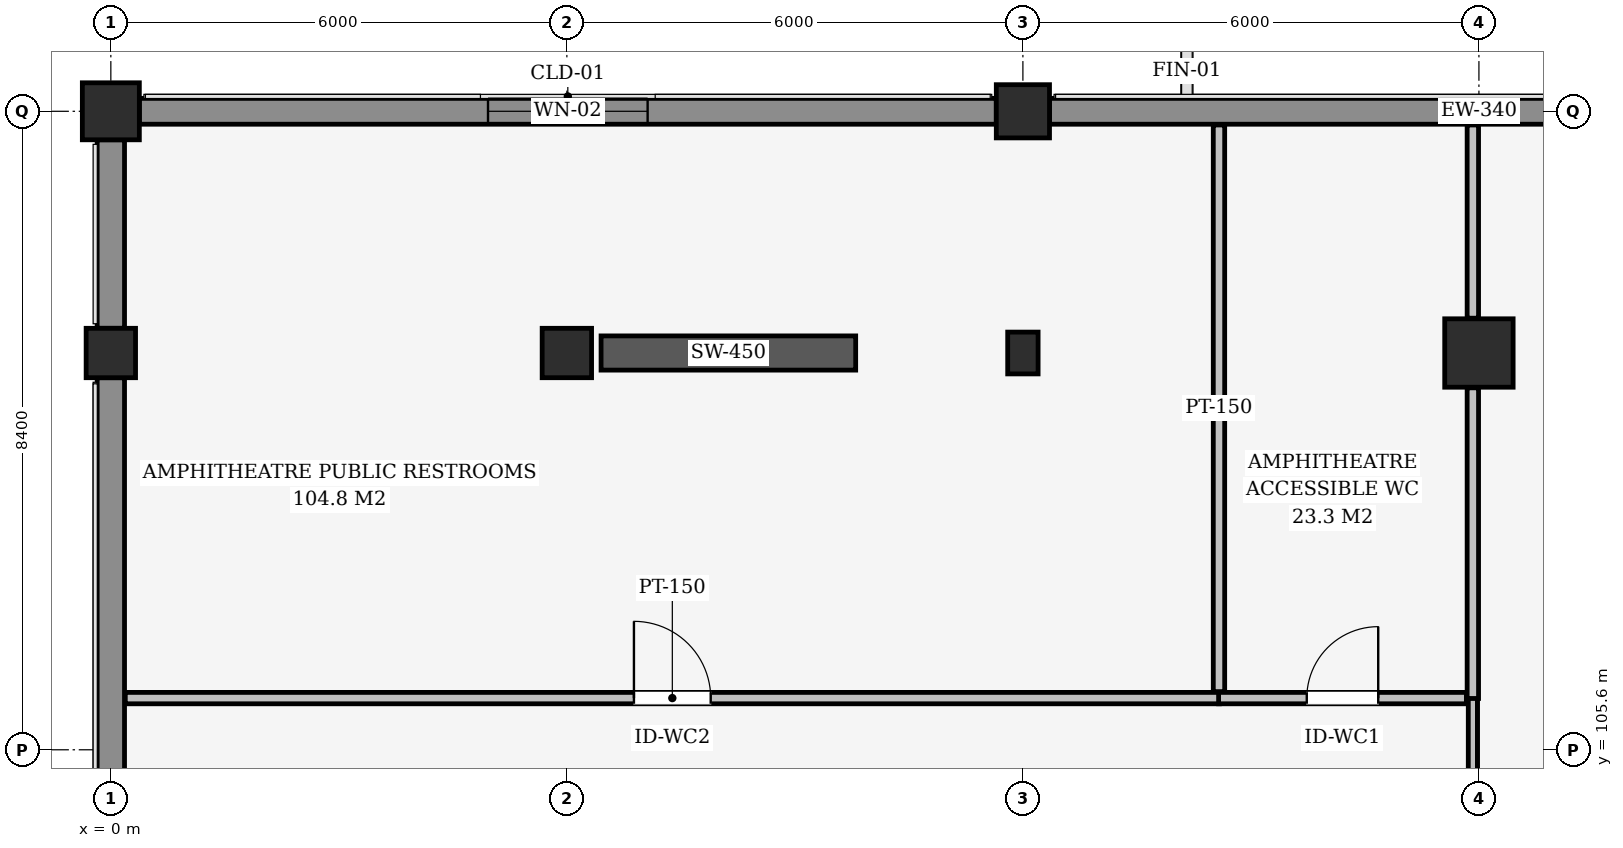
"""IFC4 building model, lengths in metres.
Left out: names, types, materials, properties, quantities, classifications, styles, units other than length and angle.
Written with IfcOpenShell. Run it as: python <this file> out.ifc"""

import sys

from ifc_helpers import new_model, si_unit, direction, frame, frame_2d, origin, origin_2d, place, context, subcontext, project, spatial, rectangle, extrude, element, fill, save


model = new_model("IFC4")
c1 = context("Model", 3, precision=1e-05, world=origin(), true_north=direction((0.0, 1.0)))
c2 = subcontext(c1, "Body", "Model", "MODEL_VIEW")
j1 = project(units=[si_unit("LENGTHUNIT", "METRE"), si_unit("PLANEANGLEUNIT", "RADIAN")], contexts=[c1])
p1 = place(None, origin())
s1 = spatial("IfcSite", under=j1, at=p1, CompositionType="ELEMENT")
p2 = place(p1, origin())
s2 = spatial("IfcBuilding", under=s1, at=p2, CompositionType="ELEMENT")
p3 = place(p2, frame((0.0, 0.0, 18.3)))
s3 = spatial("IfcBuildingStorey", under=s2, at=p3, CompositionType="ELEMENT", Elevation=18.3)
p4 = place(p3, frame((0.0, 114.0, 0.0), z_axis=(0.0, 0.0, 1.0), x_axis=(1.0, 0.0, 0.0)))
e1 = element("IfcColumn", 1, at=p4, inside=s3, PredefinedType="COLUMN", context=c2, shape_type="SweptSolid", body=[
    extrude(rectangle(XDim=0.75, YDim=0.75, at=origin_2d()), origin(), (0.0, 0.0, 1.0), 3.9),
])
p5 = place(p3, frame((12.0, 114.0, 0.0), z_axis=(0.0, 0.0, 1.0), x_axis=(1.0, 0.0, 0.0)))
e2 = element("IfcColumn", 2, at=p5, inside=s3, PredefinedType="COLUMN", context=c2, shape_type="SweptSolid", body=[
    extrude(rectangle(XDim=0.7, YDim=0.7, at=origin_2d()), origin(), (0.0, 0.0, 1.0), 3.9),
])
for number, where, z_axis, x_axis in (
    (3, (0.0, 110.82, 0.0), (0.0, 0.0, 1.0), (1.0, 0.0, 0.0)),
    (4, (6.0, 110.82, 0.0), (0.0, 0.0, 1.0), (1.0, 0.0, 0.0)),
):
    element("IfcColumn", number, at=place(p3, frame(where, z_axis=z_axis, x_axis=x_axis)), inside=s3, PredefinedType="COLUMN", context=c2, shape_type="SweptSolid", body=[
        extrude(rectangle(XDim=0.65, YDim=0.65, at=origin_2d()), origin(), (0.0, 0.0, 1.0), 3.9),
    ])
p6 = place(p3, frame((18.0, 110.82, 0.0), z_axis=(0.0, 0.0, 1.0), x_axis=(1.0, 0.0, 0.0)))
e5 = element("IfcColumn", 5, at=p6, inside=s3, PredefinedType="COLUMN", context=c2, shape_type="SweptSolid", body=[
    extrude(rectangle(XDim=0.9, YDim=0.9, at=origin_2d()), origin(), (0.0, 0.0, 1.0), 2.3),
])
p7 = place(p3, frame((12.0, 110.82, 0.0), z_axis=(0.0, 0.0, 1.0), x_axis=(1.0, 0.0, 0.0)))
e6 = element("IfcColumn", 6, at=p7, inside=s3, PredefinedType="PILASTER", context=c2, shape_type="SweptSolid", body=[
    extrude(rectangle(XDim=0.4, YDim=0.55, at=origin_2d()), origin(), (0.0, 0.0, 1.0), 2.3),
])
p8 = place(p3, frame((6.45, 110.82, 0.0), z_axis=(0.0, 0.0, 1.0), x_axis=(1.0, 0.0, 0.0)))
e7 = element("IfcWall", 7, at=p8, inside=s3, PredefinedType="SHEAR", context=c2, shape_type="SweptSolid", body=[
    extrude(rectangle(XDim=3.35, YDim=0.45, at=frame_2d((1.675, 0.0))), origin(), (0.0, 0.0, 1.0), 2.3),
])
p9 = place(p3, frame((0.375, 114.0, 0.0), z_axis=(0.0, 0.0, 1.0), x_axis=(1.0, 0.0, 0.0)))
e8 = element("IfcWall", 8, at=p9, inside=s3, PredefinedType="SOLIDWALL", context=c2, shape_type="SweptSolid", body=[
    extrude(rectangle(XDim=11.275, YDim=0.34, at=frame_2d((5.637, 0.0))), origin(), (0.0, 0.0, 1.0), 2.929),
])
p10 = place(p9, frame((4.587, 0.0, 0.85)))
e9 = element("IfcOpeningElement", 9, at=p10, cuts=e8, PredefinedType="OPENING", context=c2, shape_type="SweptSolid", body=[
    extrude(rectangle(XDim=2.1, YDim=1.8, at=frame_2d((1.05, 0.9))), frame((0.0, 0.18, 0.0), z_axis=(0.0, -1.0, 0.0), x_axis=(1.0, 0.0, 0.0)), (0.0, 0.0, 1.0), 0.36),
])
p11 = place(p3, frame((12.35, 114.0, 0.0), z_axis=(0.0, 0.0, 1.0), x_axis=(1.0, 0.0, 0.0)))
e10 = element("IfcWall", 10, at=p11, inside=s3, PredefinedType="SOLIDWALL", context=c2, shape_type="SweptSolid", body=[
    extrude(rectangle(XDim=11.3, YDim=0.34, at=frame_2d((5.65, 0.0))), origin(), (0.0, 0.0, 1.0), 3.9),
])
p12 = place(p11, frame((7.236, 0.0, 0.85)))
e11 = element("IfcOpeningElement", 11, at=p12, cuts=e10, PredefinedType="OPENING", context=c2, shape_type="SweptSolid", body=[
    extrude(rectangle(XDim=1.8, YDim=1.65, at=frame_2d((0.9, 0.825))), frame((0.0, 0.18, 0.0), z_axis=(0.0, -1.0, 0.0), x_axis=(1.0, 0.0, 0.0)), (0.0, 0.0, 1.0), 0.36),
])
p13 = place(p3, frame((0.0, 97.525, 0.0), z_axis=(0.0, 0.0, 1.0), x_axis=(0.0, 1.0, 0.0)))
e12 = element("IfcWall", 12, at=p13, inside=s3, PredefinedType="SOLIDWALL", context=c2, shape_type="SweptSolid", body=[
    extrude(rectangle(XDim=12.97, YDim=0.36, at=frame_2d((6.485, 0.0))), origin(), (0.0, 0.0, 1.0), 2.93),
])
p14 = place(p13, frame((5.36, 0.0, 0.78)))
e13 = element("IfcOpeningElement", 13, at=p14, cuts=e12, PredefinedType="OPENING", context=c2, shape_type="SweptSolid", body=[
    extrude(rectangle(XDim=2.25, YDim=1.95, at=frame_2d((1.125, 0.975))), frame((0.0, 0.19, 0.0), z_axis=(0.0, -1.0, 0.0), x_axis=(1.0, 0.0, 0.0)), (0.0, 0.0, 1.0), 0.38),
])
p15 = place(p3, frame((0.0, 111.145, 0.0), z_axis=(0.0, 0.0, 1.0), x_axis=(0.0, 1.0, 0.0)))
e14 = element("IfcWall", 14, at=p15, inside=s3, PredefinedType="SOLIDWALL", context=c2, shape_type="SweptSolid", body=[
    extrude(rectangle(XDim=2.48, YDim=0.36, at=frame_2d((1.24, 0.0))), origin(), (0.0, 0.0, 1.0), 2.928),
])
p16 = place(p3, frame((17.92, 105.005, 0.0), z_axis=(0.0, 0.0, 1.0), x_axis=(0.0, 1.0, 0.0)))
e15 = element("IfcWall", 15, at=p16, inside=s3, PredefinedType="PARTITIONING", context=c2, shape_type="SweptSolid", body=[
    extrude(rectangle(XDim=1.28, YDim=0.12, at=frame_2d((0.64, 0.0))), origin(), (0.0, 0.0, 1.0), 3.9),
])
p17 = place(p3, frame((17.92, 106.275, 0.0), z_axis=(0.0, 0.0, 1.0), x_axis=(0.0, 1.0, 0.0)))
e16 = element("IfcWall", 16, at=p17, inside=s3, PredefinedType="PARTITIONING", context=c2, shape_type="SweptSolid", body=[
    extrude(rectangle(XDim=4.087, YDim=0.15, at=frame_2d((2.043, 0.0))), origin(), (0.0, 0.0, 1.0), 3.9),
])
p18 = place(p3, frame((17.92, 111.278, 0.0), z_axis=(0.0, 0.0, 1.0), x_axis=(0.0, 1.0, 0.0)))
e17 = element("IfcWall", 17, at=p18, inside=s3, PredefinedType="PARTITIONING", context=c2, shape_type="SweptSolid", body=[
    extrude(rectangle(XDim=2.542, YDim=0.15, at=frame_2d((1.271, 0.0))), origin(), (0.0, 0.0, 1.0), 3.9),
])
p19 = place(p3, frame((0.19, 106.28, 0.0), z_axis=(0.0, 0.0, 1.0), x_axis=(1.0, 0.0, 0.0)))
e18 = element("IfcWall", 18, at=p19, inside=s3, PredefinedType="PARTITIONING", context=c2, shape_type="SweptSolid", body=[
    extrude(rectangle(XDim=14.395, YDim=0.15, at=frame_2d((7.198, 0.0))), origin(), (0.0, 0.0, 1.0), 3.54),
])
p20 = place(p19, frame((6.692, 0.0, 0.0)))
e19 = element("IfcOpeningElement", 19, at=p20, cuts=e18, PredefinedType="OPENING", context=c2, shape_type="SweptSolid", body=[
    extrude(rectangle(XDim=1.01, YDim=2.1, at=frame_2d((0.505, 1.05))), frame((0.0, 0.085, 0.0), z_axis=(0.0, -1.0, 0.0), x_axis=(1.0, 0.0, 0.0)), (0.0, 0.0, 1.0), 0.17),
])
p21 = place(p3, frame((14.575, 106.28, 0.0), z_axis=(0.0, 0.0, 1.0), x_axis=(1.0, 0.0, 0.0)))
e20 = element("IfcWall", 20, at=p21, inside=s3, PredefinedType="PARTITIONING", context=c2, shape_type="SweptSolid", body=[
    extrude(rectangle(XDim=3.26, YDim=0.15, at=frame_2d((1.63, 0.0))), origin(), (0.0, 0.0, 1.0), 3.54),
])
p22 = place(p21, frame((1.16, 0.0, 0.0)))
e21 = element("IfcOpeningElement", 21, at=p22, cuts=e20, PredefinedType="OPENING", context=c2, shape_type="SweptSolid", body=[
    extrude(rectangle(XDim=0.94, YDim=2.1, at=frame_2d((0.47, 1.05))), frame((0.0, 0.085, 0.0), z_axis=(0.0, -1.0, 0.0), x_axis=(1.0, 0.0, 0.0)), (0.0, 0.0, 1.0), 0.17),
])
p23 = place(p3, frame((14.58, 106.365, 0.0), z_axis=(0.0, 0.0, 1.0), x_axis=(0.0, 1.0, 0.0)))
e22 = element("IfcWall", 22, at=p23, inside=s3, PredefinedType="PARTITIONING", context=c2, shape_type="SweptSolid", body=[
    extrude(rectangle(XDim=7.455, YDim=0.15, at=frame_2d((3.728, 0.0))), origin(), (0.0, 0.0, 1.0), 3.54),
])
p24 = place(p10, origin())
e23 = element("IfcWindow", 23, at=p24, inside=s3, PartitioningType="SINGLE_PANEL", PredefinedType="WINDOW", context=c2, shape_type="SweptSolid", body=[
    extrude(rectangle(XDim=2.1, YDim=1.8, at=frame_2d((1.05, 0.9))), frame((0.0, 0.03, 0.0), z_axis=(0.0, -1.0, 0.0), x_axis=(1.0, 0.0, 0.0)), (0.0, 0.0, 1.0), 0.06),
])
fill(e9, e23)
p25 = place(p20, origin())
e24 = element("IfcDoor", 24, at=p25, inside=s3, OperationType="SINGLE_SWING_LEFT", PredefinedType="DOOR", context=c2, shape_type="SweptSolid", body=[
    extrude(rectangle(XDim=1.01, YDim=2.1, at=frame_2d((0.505, 1.05))), frame((0.0, 0.025, 0.0), z_axis=(0.0, -1.0, 0.0), x_axis=(1.0, 0.0, 0.0)), (0.0, 0.0, 1.0), 0.05),
])
fill(e19, e24)
p26 = place(p22, origin())
e25 = element("IfcDoor", 25, at=p26, inside=s3, OperationType="SINGLE_SWING_RIGHT", PredefinedType="DOOR", context=c2, shape_type="SweptSolid", body=[
    extrude(rectangle(XDim=0.94, YDim=2.1, at=frame_2d((0.47, 1.05))), frame((0.0, 0.025, 0.0), z_axis=(0.0, -1.0, 0.0), x_axis=(1.0, 0.0, 0.0)), (0.0, 0.0, 1.0), 0.05),
])
fill(e21, e25)
save(model, sys.argv[1])
